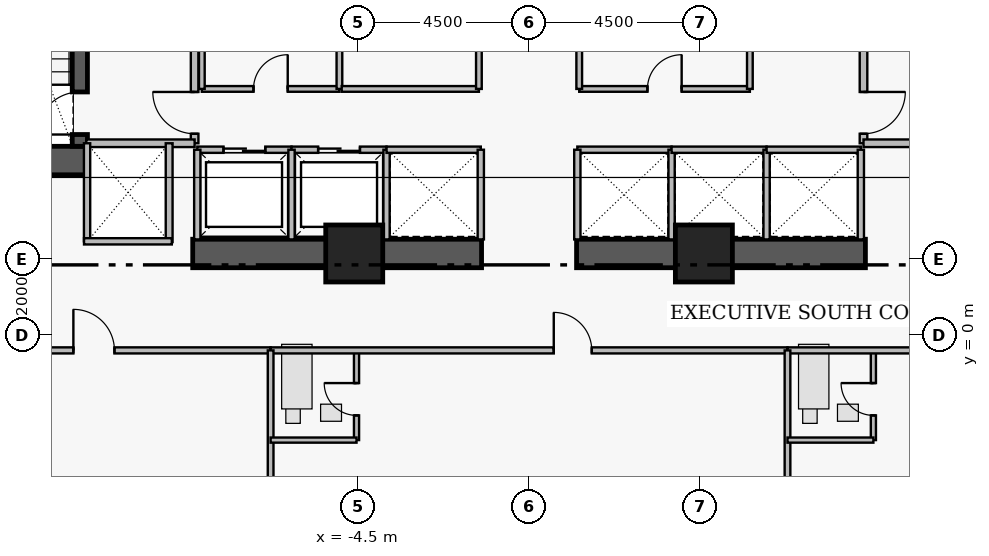
"""IFC4 building model, lengths in metres.
Left out: names, types, materials, properties, quantities, classifications, styles, units other than length and angle.
Written with IfcOpenShell. Run it as: python <this file> out.ifc"""

import sys

from ifc_helpers import new_model, si_unit, direction, frame, frame_2d, origin, origin_2d, place, context, subcontext, project, spatial, rectangle, extrude, element, fill, save


model = new_model("IFC4")
c1 = context("Model", 3, precision=1e-05, world=origin(), true_north=direction((0.0, 1.0)))
c2 = subcontext(c1, "Body", "Model", "MODEL_VIEW")
j1 = project(units=[si_unit("LENGTHUNIT", "METRE"), si_unit("PLANEANGLEUNIT", "RADIAN")], contexts=[c1])
p1 = place(None, origin())
s1 = spatial("IfcSite", under=j1, at=p1, CompositionType="ELEMENT")
p2 = place(p1, origin())
s2 = spatial("IfcBuilding", under=s1, at=p2, CompositionType="ELEMENT")
p3 = place(p2, frame((0.0, 0.0, 110.25)))
s3 = spatial("IfcBuildingStorey", under=s2, at=p3, CompositionType="ELEMENT", Elevation=110.25)
p4 = place(p3, frame((-16.16, 4.595, 0.0), z_axis=(0.0, 0.0, 1.0), x_axis=(1.0, 0.0, 0.0)))
e1 = element("IfcWall", 1, at=p4, inside=s3, PredefinedType="SHEAR", context=c2, shape_type="SweptSolid", body=[
    extrude(rectangle(XDim=4.56, YDim=0.75, at=frame_2d((2.28, 0.0))), origin(), (0.0, 0.0, 1.0), 3.46),
])
for number, where, z_axis, x_axis in (
    (2, (-8.85, 2.15, 0.0), (0.0, 0.0, 1.0), (1.0, 0.0, 0.0)),
    (3, (1.25, 2.15, 0.0), (0.0, 0.0, 1.0), (1.0, 0.0, 0.0)),
):
    element("IfcWall", number, at=place(p3, frame(where, z_axis=z_axis, x_axis=x_axis)), inside=s3, PredefinedType="SHEAR", context=c2, shape_type="SweptSolid", body=[
        extrude(rectangle(XDim=7.6, YDim=0.75, at=frame_2d((3.8, 0.0))), origin(), (0.0, 0.0, 1.0), 3.43),
    ])
p5 = place(p3, frame((-11.82, 4.97, 0.0), z_axis=(0.0, 0.0, 1.0), x_axis=(0.0, 1.0, 0.0)))
e4 = element("IfcWall", 4, at=p5, inside=s3, PredefinedType="SHEAR", context=c2, shape_type="SweptSolid", body=[
    extrude(rectangle(XDim=8.96, YDim=0.4, at=frame_2d((4.48, 0.0))), origin(), (0.0, 0.0, 1.0), 3.46),
])
p6 = place(p5, frame((0.31, 0.0, 0.0)))
e5 = element("IfcOpeningElement", 5, at=p6, cuts=e4, PredefinedType="OPENING", context=c2, shape_type="SweptSolid", body=[
    extrude(rectangle(XDim=1.12, YDim=2.22, at=frame_2d((0.56, 1.11))), frame((0.0, 0.21, 0.0), z_axis=(0.0, -1.0, 0.0), x_axis=(1.0, 0.0, 0.0)), (0.0, 0.0, 1.0), 0.42),
])
for number, where, z_axis, x_axis in (
    (6, (-4.6, 2.15, 0.0), (0.0, 0.0, 1.0), (1.0, 0.0, 0.0)),
    (7, (4.6, 2.15, 0.0), (0.0, 0.0, 1.0), (1.0, 0.0, 0.0)),
):
    element("IfcColumn", number, at=place(p3, frame(where, z_axis=z_axis, x_axis=x_axis)), inside=s3, PredefinedType="COLUMN", context=c2, shape_type="SweptSolid", body=[
        extrude(rectangle(XDim=1.5, YDim=1.5, at=origin_2d()), origin(), (0.0, 0.0, 1.0), 3.65),
    ])
p7 = place(p3, frame((-8.8, 5.05, 0.0), z_axis=(0.0, 0.0, 1.0), x_axis=(0.0, 1.0, 0.0)))
e8 = element("IfcWall", 8, at=p7, inside=s3, PredefinedType="PARTITIONING", context=c2, shape_type="SweptSolid", body=[
    extrude(rectangle(XDim=6.1, YDim=0.2, at=frame_2d((3.05, 0.0))), origin(), (0.0, 0.0, 1.0), 3.43),
])
p8 = place(p7, frame((0.25, 0.0, 0.0)))
e9 = element("IfcOpeningElement", 9, at=p8, cuts=e8, PredefinedType="OPENING", context=c2, shape_type="SweptSolid", body=[
    extrude(rectangle(XDim=1.1, YDim=2.2, at=frame_2d((0.55, 1.1))), frame((0.0, 0.11, 0.0), z_axis=(0.0, -1.0, 0.0), x_axis=(1.0, 0.0, 0.0)), (0.0, 0.0, 1.0), 0.22),
])
p9 = place(p7, frame((3.85, 0.0, 0.0)))
e10 = element("IfcOpeningElement", 10, at=p9, cuts=e8, PredefinedType="OPENING", context=c2, shape_type="SweptSolid", body=[
    extrude(rectangle(XDim=1.1, YDim=2.2, at=frame_2d((0.55, 1.1))), frame((0.0, 0.11, 0.0), z_axis=(0.0, -1.0, 0.0), x_axis=(1.0, 0.0, 0.0)), (0.0, 0.0, 1.0), 0.22),
])
p10 = place(p3, frame((8.8, 11.15, 0.0), z_axis=(0.0, 0.0, 1.0), x_axis=(0.0, -1.0, 0.0)))
e11 = element("IfcWall", 11, at=p10, inside=s3, PredefinedType="PARTITIONING", context=c2, shape_type="SweptSolid", body=[
    extrude(rectangle(XDim=6.1, YDim=0.2, at=frame_2d((3.05, 0.0))), origin(), (0.0, 0.0, 1.0), 3.43),
])
p11 = place(p10, frame((1.15, 0.0, 0.0)))
e12 = element("IfcOpeningElement", 12, at=p11, cuts=e11, PredefinedType="OPENING", context=c2, shape_type="SweptSolid", body=[
    extrude(rectangle(XDim=1.1, YDim=2.2, at=frame_2d((0.55, 1.1))), frame((0.0, 0.11, 0.0), z_axis=(0.0, -1.0, 0.0), x_axis=(1.0, 0.0, 0.0)), (0.0, 0.0, 1.0), 0.22),
])
p12 = place(p10, frame((4.75, 0.0, 0.0)))
e13 = element("IfcOpeningElement", 13, at=p12, cuts=e11, PredefinedType="OPENING", context=c2, shape_type="SweptSolid", body=[
    extrude(rectangle(XDim=1.1, YDim=2.2, at=frame_2d((0.55, 1.1))), frame((0.0, 0.11, 0.0), z_axis=(0.0, -1.0, 0.0), x_axis=(1.0, 0.0, 0.0)), (0.0, 0.0, 1.0), 0.22),
])
p13 = place(p3, frame((-8.73, 4.88, 0.0), z_axis=(0.0, 0.0, 1.0), x_axis=(1.0, 0.0, 0.0)))
e14 = element("IfcWall", 14, at=p13, inside=s3, PredefinedType="PARTITIONING", context=c2, shape_type="SweptSolid", body=[
    extrude(rectangle(XDim=2.48, YDim=0.165, at=frame_2d((1.24, 0.0))), origin(), (0.0, 0.0, 1.0), 3.43),
])
p14 = place(p13, frame((0.69, 0.0, 0.0)))
e15 = element("IfcOpeningElement", 15, at=p14, cuts=e14, PredefinedType="OPENING", context=c2, shape_type="SweptSolid", body=[
    extrude(rectangle(XDim=1.1, YDim=2.25, at=frame_2d((0.55, 1.125))), frame((0.0, 0.093, 0.0), z_axis=(0.0, -1.0, 0.0), x_axis=(1.0, 0.0, 0.0)), (0.0, 0.0, 1.0), 0.185),
])
p15 = place(p3, frame((-6.25, 4.88, 0.0), z_axis=(0.0, 0.0, 1.0), x_axis=(1.0, 0.0, 0.0)))
e16 = element("IfcWall", 16, at=p15, inside=s3, PredefinedType="PARTITIONING", context=c2, shape_type="SweptSolid", body=[
    extrude(rectangle(XDim=2.5, YDim=0.165, at=frame_2d((1.25, 0.0))), origin(), (0.0, 0.0, 1.0), 3.43),
])
p16 = place(p15, frame((0.7, 0.0, 0.0)))
e17 = element("IfcOpeningElement", 17, at=p16, cuts=e16, PredefinedType="OPENING", context=c2, shape_type="SweptSolid", body=[
    extrude(rectangle(XDim=1.1, YDim=2.25, at=frame_2d((0.55, 1.125))), frame((0.0, 0.093, 0.0), z_axis=(0.0, -1.0, 0.0), x_axis=(1.0, 0.0, 0.0)), (0.0, 0.0, 1.0), 0.185),
])
p17 = place(p3, frame((-8.61, 6.48, 0.0), z_axis=(0.0, 0.0, 1.0), x_axis=(1.0, 0.0, 0.0)))
e18 = element("IfcWall", 18, at=p17, inside=s3, PredefinedType="PARTITIONING", context=c2, shape_type="SweptSolid", body=[
    extrude(rectangle(XDim=3.62, YDim=0.15, at=frame_2d((1.81, 0.0))), origin(), (0.0, 0.0, 1.0), 3.43),
])
p18 = place(p17, frame((1.36, 0.0, 0.0)))
e19 = element("IfcOpeningElement", 19, at=p18, cuts=e18, PredefinedType="OPENING", context=c2, shape_type="SweptSolid", body=[
    extrude(rectangle(XDim=0.9, YDim=2.15, at=frame_2d((0.45, 1.075))), frame((0.0, 0.085, 0.0), z_axis=(0.0, -1.0, 0.0), x_axis=(1.0, 0.0, 0.0)), (0.0, 0.0, 1.0), 0.17),
])
p19 = place(p3, frame((1.32, 6.48, 0.0), z_axis=(0.0, 0.0, 1.0), x_axis=(1.0, 0.0, 0.0)))
e20 = element("IfcWall", 20, at=p19, inside=s3, PredefinedType="PARTITIONING", context=c2, shape_type="SweptSolid", body=[
    extrude(rectangle(XDim=4.49, YDim=0.15, at=frame_2d((2.245, 0.0))), origin(), (0.0, 0.0, 1.0), 3.43),
])
p20 = place(p19, frame((1.795, 0.0, 0.0)))
e21 = element("IfcOpeningElement", 21, at=p20, cuts=e20, PredefinedType="OPENING", context=c2, shape_type="SweptSolid", body=[
    extrude(rectangle(XDim=0.9, YDim=2.15, at=frame_2d((0.45, 1.075))), frame((0.0, 0.085, 0.0), z_axis=(0.0, -1.0, 0.0), x_axis=(1.0, 0.0, 0.0)), (0.0, 0.0, 1.0), 0.17),
])
p21 = place(p3, frame((-20.6, -0.4, 0.0), z_axis=(0.0, 0.0, 1.0), x_axis=(1.0, 0.0, 0.0)))
e22 = element("IfcWall", 22, at=p21, inside=s3, PredefinedType="PARTITIONING", context=c2, shape_type="SweptSolid", body=[
    extrude(rectangle(XDim=13.8, YDim=0.16, at=frame_2d((6.9, 0.0))), origin(), (0.0, 0.0, 1.0), 3.43),
])
p22 = place(p21, frame((8.61, 0.0, 0.0)))
e23 = element("IfcOpeningElement", 23, at=p22, cuts=e22, PredefinedType="OPENING", context=c2, shape_type="SweptSolid", body=[
    extrude(rectangle(XDim=1.08, YDim=2.18, at=frame_2d((0.54, 1.09))), frame((0.0, 0.09, 0.0), z_axis=(0.0, -1.0, 0.0), x_axis=(1.0, 0.0, 0.0)), (0.0, 0.0, 1.0), 0.18),
])
p23 = place(p3, frame((-4.54, -2.76, 0.0), z_axis=(0.0, 0.0, 1.0), x_axis=(0.0, 1.0, 0.0)))
e24 = element("IfcWall", 24, at=p23, inside=s3, PredefinedType="PLUMBINGWALL", context=c2, shape_type="SweptSolid", body=[
    extrude(rectangle(XDim=2.36, YDim=0.135, at=frame_2d((1.18, 0.0))), origin(), (0.0, 0.0, 1.0), 2.747),
])
p24 = place(p23, frame((0.65, 0.0, 0.0)))
e25 = element("IfcOpeningElement", 25, at=p24, cuts=e24, PredefinedType="OPENING", context=c2, shape_type="SweptSolid", body=[
    extrude(rectangle(XDim=0.85, YDim=2.1, at=frame_2d((0.425, 1.05))), frame((0.0, 0.077, 0.0), z_axis=(0.0, -1.0, 0.0), x_axis=(1.0, 0.0, 0.0)), (0.0, 0.0, 1.0), 0.155),
])
p25 = place(p3, frame((-6.8, -0.4, 0.0), z_axis=(0.0, 0.0, 1.0), x_axis=(1.0, 0.0, 0.0)))
e26 = element("IfcWall", 26, at=p25, inside=s3, PredefinedType="PARTITIONING", context=c2, shape_type="SweptSolid", body=[
    extrude(rectangle(XDim=13.6, YDim=0.16, at=frame_2d((6.8, 0.0))), origin(), (0.0, 0.0, 1.0), 3.43),
])
p26 = place(p25, frame((7.45, 0.0, 0.0)))
e27 = element("IfcOpeningElement", 27, at=p26, cuts=e26, PredefinedType="OPENING", context=c2, shape_type="SweptSolid", body=[
    extrude(rectangle(XDim=1.0, YDim=2.15, at=frame_2d((0.5, 1.075))), frame((0.0, 0.09, 0.0), z_axis=(0.0, -1.0, 0.0), x_axis=(1.0, 0.0, 0.0)), (0.0, 0.0, 1.0), 0.18),
])
p27 = place(p3, frame((9.06, -2.76, 0.0), z_axis=(0.0, 0.0, 1.0), x_axis=(0.0, 1.0, 0.0)))
e28 = element("IfcWall", 28, at=p27, inside=s3, PredefinedType="PLUMBINGWALL", context=c2, shape_type="SweptSolid", body=[
    extrude(rectangle(XDim=2.36, YDim=0.135, at=frame_2d((1.18, 0.0))), origin(), (0.0, 0.0, 1.0), 3.43),
])
p28 = place(p27, frame((0.65, 0.0, 0.0)))
e29 = element("IfcOpeningElement", 29, at=p28, cuts=e28, PredefinedType="OPENING", context=c2, shape_type="SweptSolid", body=[
    extrude(rectangle(XDim=0.85, YDim=2.1, at=frame_2d((0.425, 1.05))), frame((0.0, 0.077, 0.0), z_axis=(0.0, -1.0, 0.0), x_axis=(1.0, 0.0, 0.0)), (0.0, 0.0, 1.0), 0.155),
])
p29 = place(p3, frame((6.8, -0.4, 0.0), z_axis=(0.0, 0.0, 1.0), x_axis=(1.0, 0.0, 0.0)))
e30 = element("IfcWall", 30, at=p29, inside=s3, PredefinedType="PARTITIONING", context=c2, shape_type="SweptSolid", body=[
    extrude(rectangle(XDim=13.8, YDim=0.16, at=frame_2d((6.9, 0.0))), origin(), (0.0, 0.0, 1.0), 3.43),
])
p30 = place(p29, frame((7.425, 0.0, 0.0)))
e31 = element("IfcOpeningElement", 31, at=p30, cuts=e30, PredefinedType="OPENING", context=c2, shape_type="SweptSolid", body=[
    extrude(rectangle(XDim=1.0, YDim=2.15, at=frame_2d((0.5, 1.075))), frame((0.0, 0.09, 0.0), z_axis=(0.0, -1.0, 0.0), x_axis=(1.0, 0.0, 0.0)), (0.0, 0.0, 1.0), 0.18),
])
for number, where, z_axis, x_axis in (
    (32, (-11.65, 5.05, 0.0), (0.0, 0.0, 1.0), (1.0, 0.0, 0.0)),
    (33, (8.8, 5.05, 0.0), (0.0, 0.0, 1.0), (1.0, 0.0, 0.0)),
):
    element("IfcWall", number, at=place(p3, frame(where, z_axis=z_axis, x_axis=x_axis)), inside=s3, PredefinedType="PARTITIONING", context=c2, shape_type="SweptSolid", body=[
        extrude(rectangle(XDim=2.85, YDim=0.2, at=frame_2d((1.425, 0.0))), origin(), (0.0, 0.0, 1.0), 3.43),
    ])
for number, where, z_axis, x_axis in (
    (34, (-8.73, 2.52, 0.0), (0.0, 0.0, 1.0), (0.0, 1.0, 0.0)),
    (35, (-6.25, 2.52, 0.0), (0.0, 0.0, 1.0), (0.0, 1.0, 0.0)),
    (36, (-3.75, 2.52, 0.0), (0.0, 0.0, 1.0), (0.0, 1.0, 0.0)),
):
    element("IfcWall", number, at=place(p3, frame(where, z_axis=z_axis, x_axis=x_axis)), inside=s3, PredefinedType="PARTITIONING", context=c2, shape_type="SweptSolid", body=[
        extrude(rectangle(XDim=2.36, YDim=0.165, at=frame_2d((1.18, 0.0))), origin(), (0.0, 0.0, 1.0), 3.43),
    ])
p31 = place(p3, frame((-3.75, 4.88, 0.0), z_axis=(0.0, 0.0, 1.0), x_axis=(1.0, 0.0, 0.0)))
e37 = element("IfcWall", 37, at=p31, inside=s3, PredefinedType="PARTITIONING", context=c2, shape_type="SweptSolid", body=[
    extrude(rectangle(XDim=2.48, YDim=0.165, at=frame_2d((1.24, 0.0))), origin(), (0.0, 0.0, 1.0), 3.43),
])
p32 = place(p3, frame((-1.27, 2.52, 0.0), z_axis=(0.0, 0.0, 1.0), x_axis=(0.0, 1.0, 0.0)))
e38 = element("IfcWall", 38, at=p32, inside=s3, PredefinedType="PARTITIONING", context=c2, shape_type="SweptSolid", body=[
    extrude(rectangle(XDim=2.36, YDim=0.165, at=frame_2d((1.18, 0.0))), origin(), (0.0, 0.0, 1.0), 3.43),
])
p33 = place(p3, frame((1.27, 4.88, 0.0), z_axis=(0.0, 0.0, 1.0), x_axis=(1.0, 0.0, 0.0)))
e39 = element("IfcWall", 39, at=p33, inside=s3, PredefinedType="PARTITIONING", context=c2, shape_type="SweptSolid", body=[
    extrude(rectangle(XDim=2.48, YDim=0.165, at=frame_2d((1.24, 0.0))), origin(), (0.0, 0.0, 1.0), 3.43),
])
for number, where, z_axis, x_axis in (
    (40, (1.27, 2.52, 0.0), (0.0, 0.0, 1.0), (0.0, 1.0, 0.0)),
    (41, (3.75, 2.52, 0.0), (0.0, 0.0, 1.0), (0.0, 1.0, 0.0)),
):
    element("IfcWall", number, at=place(p3, frame(where, z_axis=z_axis, x_axis=x_axis)), inside=s3, PredefinedType="PARTITIONING", context=c2, shape_type="SweptSolid", body=[
        extrude(rectangle(XDim=2.36, YDim=0.165, at=frame_2d((1.18, 0.0))), origin(), (0.0, 0.0, 1.0), 3.43),
    ])
p34 = place(p3, frame((3.75, 4.88, 0.0), z_axis=(0.0, 0.0, 1.0), x_axis=(1.0, 0.0, 0.0)))
e42 = element("IfcWall", 42, at=p34, inside=s3, PredefinedType="PARTITIONING", context=c2, shape_type="SweptSolid", body=[
    extrude(rectangle(XDim=2.5, YDim=0.165, at=frame_2d((1.25, 0.0))), origin(), (0.0, 0.0, 1.0), 3.43),
])
p35 = place(p3, frame((6.25, 2.52, 0.0), z_axis=(0.0, 0.0, 1.0), x_axis=(0.0, 1.0, 0.0)))
e43 = element("IfcWall", 43, at=p35, inside=s3, PredefinedType="PARTITIONING", context=c2, shape_type="SweptSolid", body=[
    extrude(rectangle(XDim=2.36, YDim=0.165, at=frame_2d((1.18, 0.0))), origin(), (0.0, 0.0, 1.0), 3.43),
])
p36 = place(p3, frame((6.25, 4.88, 0.0), z_axis=(0.0, 0.0, 1.0), x_axis=(1.0, 0.0, 0.0)))
e44 = element("IfcWall", 44, at=p36, inside=s3, PredefinedType="PARTITIONING", context=c2, shape_type="SweptSolid", body=[
    extrude(rectangle(XDim=2.48, YDim=0.165, at=frame_2d((1.24, 0.0))), origin(), (0.0, 0.0, 1.0), 3.43),
])
p37 = place(p3, frame((8.73, 2.52, 0.0), z_axis=(0.0, 0.0, 1.0), x_axis=(0.0, 1.0, 0.0)))
e45 = element("IfcWall", 45, at=p37, inside=s3, PredefinedType="PARTITIONING", context=c2, shape_type="SweptSolid", body=[
    extrude(rectangle(XDim=2.36, YDim=0.165, at=frame_2d((1.18, 0.0))), origin(), (0.0, 0.0, 1.0), 3.43),
])
p38 = place(p3, frame((-9.47, 2.45, 0.0), z_axis=(0.0, 0.0, 1.0), x_axis=(0.0, 1.0, 0.0)))
e46 = element("IfcWall", 46, at=p38, inside=s3, PredefinedType="PARTITIONING", context=c2, shape_type="SweptSolid", body=[
    extrude(rectangle(XDim=2.6, YDim=0.18, at=frame_2d((1.3, 0.0))), origin(), (0.0, 0.0, 1.0), 3.43),
])
p39 = place(p3, frame((-11.63, 2.47, 0.0), z_axis=(0.0, 0.0, 1.0), x_axis=(0.0, 1.0, 0.0)))
e47 = element("IfcWall", 47, at=p39, inside=s3, PredefinedType="PARTITIONING", context=c2, shape_type="SweptSolid", body=[
    extrude(rectangle(XDim=2.58, YDim=0.165, at=frame_2d((1.29, 0.0))), origin(), (0.0, 0.0, 1.0), 3.43),
])
p40 = place(p3, frame((-11.71, 2.47, 0.0), z_axis=(0.0, 0.0, 1.0), x_axis=(1.0, 0.0, 0.0)))
e48 = element("IfcWall", 48, at=p40, inside=s3, PredefinedType="PARTITIONING", context=c2, shape_type="SweptSolid", body=[
    extrude(rectangle(XDim=2.31, YDim=0.165, at=frame_2d((1.155, 0.0))), origin(), (0.0, 0.0, 1.0), 2.03),
])
for number, where, z_axis, x_axis in (
    (49, (-8.61, 6.48, 0.0), (0.0, 0.0, 1.0), (0.0, 1.0, 0.0)),
    (50, (-4.99, 6.48, 0.0), (0.0, 0.0, 1.0), (0.0, 1.0, 0.0)),
):
    element("IfcWall", number, at=place(p3, frame(where, z_axis=z_axis, x_axis=x_axis)), inside=s3, PredefinedType="PARTITIONING", context=c2, shape_type="SweptSolid", body=[
        extrude(rectangle(XDim=2.24, YDim=0.15, at=frame_2d((1.12, 0.0))), origin(), (0.0, 0.0, 1.0), 3.43),
    ])
p41 = place(p3, frame((-4.93, 6.48, 0.0), z_axis=(0.0, 0.0, 1.0), x_axis=(1.0, 0.0, 0.0)))
e51 = element("IfcWall", 51, at=p41, inside=s3, PredefinedType="PARTITIONING", context=c2, shape_type="SweptSolid", body=[
    extrude(rectangle(XDim=3.61, YDim=0.15, at=frame_2d((1.805, 0.0))), origin(), (0.0, 0.0, 1.0), 3.43),
])
for number, where, z_axis, x_axis in (
    (52, (-1.32, 6.48, 0.0), (0.0, 0.0, 1.0), (0.0, 1.0, 0.0)),
    (53, (1.32, 6.48, 0.0), (0.0, 0.0, 1.0), (0.0, 1.0, 0.0)),
    (54, (5.81, 6.48, 0.0), (0.0, 0.0, 1.0), (0.0, 1.0, 0.0)),
):
    element("IfcWall", number, at=place(p3, frame(where, z_axis=z_axis, x_axis=x_axis)), inside=s3, PredefinedType="PARTITIONING", context=c2, shape_type="SweptSolid", body=[
        extrude(rectangle(XDim=2.24, YDim=0.15, at=frame_2d((1.12, 0.0))), origin(), (0.0, 0.0, 1.0), 3.43),
    ])
p42 = place(p3, frame((-6.8, -15.34, 0.0), z_axis=(0.0, 0.0, 1.0), x_axis=(0.0, 1.0, 0.0)))
e55 = element("IfcWall", 55, at=p42, inside=s3, PredefinedType="PARTITIONING", context=c2, shape_type="SweptSolid", body=[
    extrude(rectangle(XDim=14.94, YDim=0.15, at=frame_2d((7.47, 0.0))), origin(), (0.0, 0.0, 1.0), 3.43),
])
p43 = place(p3, frame((-6.8, -2.76, 0.0), z_axis=(0.0, 0.0, 1.0), x_axis=(1.0, 0.0, 0.0)))
e56 = element("IfcWall", 56, at=p43, inside=s3, PredefinedType="PLUMBINGWALL", context=c2, shape_type="SweptSolid", body=[
    extrude(rectangle(XDim=2.26, YDim=0.135, at=frame_2d((1.13, 0.0))), origin(), (0.0, 0.0, 1.0), 3.43),
])
p44 = place(p3, frame((6.8, -15.32, 0.0), z_axis=(0.0, 0.0, 1.0), x_axis=(0.0, 1.0, 0.0)))
e57 = element("IfcWall", 57, at=p44, inside=s3, PredefinedType="PARTITIONING", context=c2, shape_type="SweptSolid", body=[
    extrude(rectangle(XDim=14.92, YDim=0.15, at=frame_2d((7.46, 0.0))), origin(), (0.0, 0.0, 1.0), 3.43),
])
p45 = place(p3, frame((6.8, -2.76, 0.0), z_axis=(0.0, 0.0, 1.0), x_axis=(1.0, 0.0, 0.0)))
e58 = element("IfcWall", 58, at=p45, inside=s3, PredefinedType="PLUMBINGWALL", context=c2, shape_type="SweptSolid", body=[
    extrude(rectangle(XDim=2.26, YDim=0.135, at=frame_2d((1.13, 0.0))), origin(), (0.0, 0.0, 1.0), 3.43),
])
p46 = place(p6, origin())
e59 = element("IfcDoor", 59, at=p46, inside=s3, OperationType="SINGLE_SWING_LEFT", PredefinedType="DOOR", context=c2, shape_type="SweptSolid", body=[
    extrude(rectangle(XDim=1.12, YDim=2.22, at=frame_2d((0.56, 1.11))), frame((0.0, 0.025, 0.0), z_axis=(0.0, -1.0, 0.0), x_axis=(1.0, 0.0, 0.0)), (0.0, 0.0, 1.0), 0.05),
])
fill(e5, e59)
p47 = place(p8, origin())
e60 = element("IfcDoor", 60, at=p47, inside=s3, OperationType="SINGLE_SWING_RIGHT", PredefinedType="DOOR", context=c2, shape_type="SweptSolid", body=[
    extrude(rectangle(XDim=1.1, YDim=2.2, at=frame_2d((0.55, 1.1))), frame((0.0, 0.025, 0.0), z_axis=(0.0, -1.0, 0.0), x_axis=(1.0, 0.0, 0.0)), (0.0, 0.0, 1.0), 0.05),
])
fill(e9, e60)
p48 = place(p12, origin())
e61 = element("IfcDoor", 61, at=p48, inside=s3, OperationType="SINGLE_SWING_LEFT", PredefinedType="DOOR", context=c2, shape_type="SweptSolid", body=[
    extrude(rectangle(XDim=1.1, YDim=2.2, at=frame_2d((0.55, 1.1))), frame((0.0, 0.025, 0.0), z_axis=(0.0, -1.0, 0.0), x_axis=(1.0, 0.0, 0.0)), (0.0, 0.0, 1.0), 0.05),
])
fill(e13, e61)
p49 = place(p14, origin())
e62 = element("IfcDoor", 62, at=p49, inside=s3, OperationType="SLIDING_TO_LEFT", PredefinedType="DOOR", context=c2, shape_type="SweptSolid", body=[
    extrude(rectangle(XDim=1.1, YDim=2.25, at=frame_2d((0.55, 1.125))), frame((0.0, 0.025, 0.0), z_axis=(0.0, -1.0, 0.0), x_axis=(1.0, 0.0, 0.0)), (0.0, 0.0, 1.0), 0.05),
])
fill(e15, e62)
p50 = place(p16, origin())
e63 = element("IfcDoor", 63, at=p50, inside=s3, OperationType="SLIDING_TO_LEFT", PredefinedType="DOOR", context=c2, shape_type="SweptSolid", body=[
    extrude(rectangle(XDim=1.1, YDim=2.25, at=frame_2d((0.55, 1.125))), frame((0.0, 0.025, 0.0), z_axis=(0.0, -1.0, 0.0), x_axis=(1.0, 0.0, 0.0)), (0.0, 0.0, 1.0), 0.05),
])
fill(e17, e63)
p51 = place(p18, origin())
e64 = element("IfcDoor", 64, at=p51, inside=s3, OperationType="SINGLE_SWING_RIGHT", PredefinedType="DOOR", context=c2, shape_type="SweptSolid", body=[
    extrude(rectangle(XDim=0.9, YDim=2.15, at=frame_2d((0.45, 1.075))), frame((0.0, 0.025, 0.0), z_axis=(0.0, -1.0, 0.0), x_axis=(1.0, 0.0, 0.0)), (0.0, 0.0, 1.0), 0.05),
])
fill(e19, e64)
p52 = place(p20, origin())
e65 = element("IfcDoor", 65, at=p52, inside=s3, OperationType="SINGLE_SWING_RIGHT", PredefinedType="DOOR", context=c2, shape_type="SweptSolid", body=[
    extrude(rectangle(XDim=0.9, YDim=2.15, at=frame_2d((0.45, 1.075))), frame((0.0, 0.025, 0.0), z_axis=(0.0, -1.0, 0.0), x_axis=(1.0, 0.0, 0.0)), (0.0, 0.0, 1.0), 0.05),
])
fill(e21, e65)
p53 = place(p22, origin())
e66 = element("IfcDoor", 66, at=p53, inside=s3, OperationType="SINGLE_SWING_LEFT", PredefinedType="DOOR", context=c2, shape_type="SweptSolid", body=[
    extrude(rectangle(XDim=1.08, YDim=2.18, at=frame_2d((0.54, 1.09))), frame((0.0, 0.025, 0.0), z_axis=(0.0, -1.0, 0.0), x_axis=(1.0, 0.0, 0.0)), (0.0, 0.0, 1.0), 0.05),
])
fill(e23, e66)
p54 = place(p24, origin())
e67 = element("IfcDoor", 67, at=p54, inside=s3, OperationType="SINGLE_SWING_RIGHT", PredefinedType="DOOR", context=c2, shape_type="SweptSolid", body=[
    extrude(rectangle(XDim=0.85, YDim=2.1, at=frame_2d((0.425, 1.05))), frame((0.0, 0.025, 0.0), z_axis=(0.0, -1.0, 0.0), x_axis=(1.0, 0.0, 0.0)), (0.0, 0.0, 1.0), 0.05),
])
fill(e25, e67)
p55 = place(p26, origin())
e68 = element("IfcDoor", 68, at=p55, inside=s3, OperationType="SINGLE_SWING_LEFT", PredefinedType="DOOR", context=c2, shape_type="SweptSolid", body=[
    extrude(rectangle(XDim=1.0, YDim=2.15, at=frame_2d((0.5, 1.075))), frame((0.0, 0.025, 0.0), z_axis=(0.0, -1.0, 0.0), x_axis=(1.0, 0.0, 0.0)), (0.0, 0.0, 1.0), 0.05),
])
fill(e27, e68)
p56 = place(p28, origin())
e69 = element("IfcDoor", 69, at=p56, inside=s3, OperationType="SINGLE_SWING_RIGHT", PredefinedType="DOOR", context=c2, shape_type="SweptSolid", body=[
    extrude(rectangle(XDim=0.85, YDim=2.1, at=frame_2d((0.425, 1.05))), frame((0.0, 0.025, 0.0), z_axis=(0.0, -1.0, 0.0), x_axis=(1.0, 0.0, 0.0)), (0.0, 0.0, 1.0), 0.05),
])
fill(e29, e69)
save(model, sys.argv[1])
